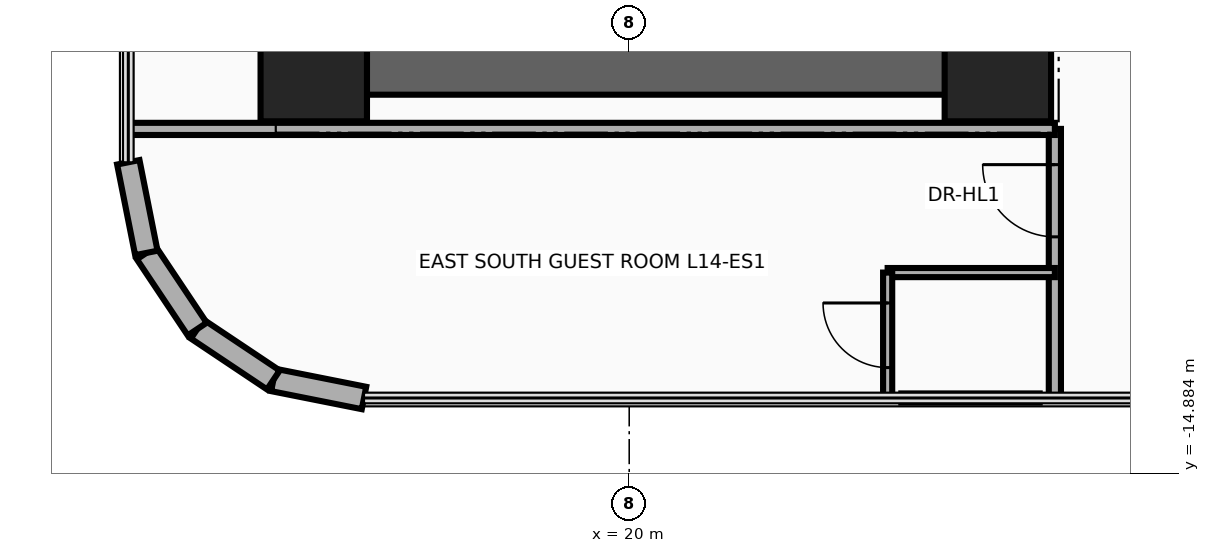
"""IFC4 building model, lengths in metres.
Left out: names, types, materials, properties, quantities, classifications, styles, units other than length and angle.
Written with IfcOpenShell. Run it as: python <this file> out.ifc"""

import sys

from ifc_helpers import new_model, si_unit, direction, frame, frame_2d, origin, origin_2d, place, context, subcontext, project, spatial, rectangle, extrude, source, transform, mapped, element, fill, save


model = new_model("IFC4")
c1 = context("Model", 3, precision=1e-05, world=origin(), true_north=direction((0.0, 1.0)))
c2 = subcontext(c1, "Body", "Model", "MODEL_VIEW")
j1 = project(units=[si_unit("LENGTHUNIT", "METRE"), si_unit("PLANEANGLEUNIT", "RADIAN")], contexts=[c1])
p1 = place(None, origin())
s1 = spatial("IfcSite", under=j1, at=p1, CompositionType="ELEMENT")
p2 = place(p1, origin())
s2 = spatial("IfcBuilding", under=s1, at=p2, CompositionType="ELEMENT")
p3 = place(p2, frame((0.0, 0.0, 59.3)))
s3 = spatial("IfcBuildingStorey", under=s2, at=p3, CompositionType="ELEMENT", Elevation=59.3)
p4 = place(p3, frame((24.85, -9.9, 0.0), z_axis=(0.0, 0.0, 1.0), x_axis=(0.0, 1.0, 0.0)))
e1 = element("IfcWall", 1, at=p4, inside=s3, PredefinedType="SHEAR", context=c2, shape_type="SweptSolid", body=[
    extrude(rectangle(XDim=8.95, YDim=0.7, at=frame_2d((4.475, 0.0))), origin(), (0.0, 0.0, 1.0), 3.46),
])
p5 = place(p3, frame((15.85, -9.55, 0.0), z_axis=(0.0, 0.0, 1.0), x_axis=(1.0, 0.0, 0.0)))
e2 = element("IfcWall", 2, at=p5, inside=s3, PredefinedType="SHEAR", context=c2, shape_type="SweptSolid", body=[
    extrude(rectangle(XDim=9.0, YDim=0.7, at=frame_2d((4.5, 0.0))), origin(), (0.0, 0.0, 1.0), 3.46),
])
m1 = source(origin(), c2, "Body", "SweptSolid", [
    extrude(rectangle(XDim=1.4, YDim=1.4, at=origin_2d()), origin(), (0.0, 0.0, 1.0), 3.7),
])
for number, where, z_axis, x_axis in (
    (3, (15.85, -9.55, 0.0), (0.0, 0.0, 1.0), (1.0, 0.0, 0.0)),
    (4, (24.85, -9.55, 0.0), (0.0, 0.0, 1.0), (1.0, 0.0, 0.0)),
):
    element("IfcColumn", number, at=place(p3, frame(where, z_axis=z_axis, x_axis=x_axis)), inside=s3, PredefinedType="COLUMN", context=c2, shape_type="MappedRepresentation", body=[
        mapped(m1, transform((0.0, 0.0, 0.0), x_axis=(1.0, 0.0, 0.0), y_axis=(0.0, 1.0, 0.0), z_axis=(0.0, 0.0, 1.0), scale=1.0)),
    ])
p6 = place(p3, frame((16.511, -13.89, 0.0), z_axis=(0.0, 0.0, 1.0), x_axis=(-0.980804027463, 0.194996050505, 0.0)))
e5 = element("IfcWall", 5, at=p6, inside=s3, PredefinedType="SOLIDWALL", context=c2, shape_type="SweptSolid", body=[
    extrude(rectangle(XDim=1.216, YDim=0.3, at=frame_2d((0.608, 0.0))), origin(), (0.0, 0.0, 1.0), 3.46),
])
for number, where, z_axis, x_axis in (
    (6, (15.318, -13.653, 0.0), (0.0, 0.0, 1.0), (-0.831, 0.556, 0.0)),
    (7, (14.317, -12.983, 0.0), (0.0, 0.0, 1.0), (-0.556, 0.831, 0.0)),
):
    element("IfcWall", number, at=place(p3, frame(where, z_axis=z_axis, x_axis=x_axis)), inside=s3, PredefinedType="SOLIDWALL", context=c2, shape_type="SweptSolid", body=[
        extrude(rectangle(XDim=1.205, YDim=0.3, at=frame_2d((0.603, 0.0))), origin(), (0.0, 0.0, 1.0), 3.46),
    ])
p7 = place(p3, frame((13.647, -11.982, 0.0), z_axis=(0.0, 0.0, 1.0), x_axis=(-0.195189223115, 0.980765602568, 0.0)))
e8 = element("IfcWall", 8, at=p7, inside=s3, PredefinedType="SOLIDWALL", context=c2, shape_type="SweptSolid", body=[
    extrude(rectangle(XDim=1.216, YDim=0.3, at=frame_2d((0.608, 0.0))), origin(), (0.0, 0.0, 1.0), 3.46),
])
p8 = place(p3, frame((25.6, -13.89, 0.0), z_axis=(0.0, 0.0, 1.0), x_axis=(0.0, 1.0, 0.0)))
e9 = element("IfcWall", 9, at=p8, inside=s3, PredefinedType="PARTITIONING", context=c2, shape_type="SweptSolid", body=[
    extrude(rectangle(XDim=3.54, YDim=0.16, at=frame_2d((1.77, 0.0))), origin(), (0.0, 0.0, 1.0), 3.46),
])
p9 = place(p8, frame((2.12, 0.0, 0.0)))
e10 = element("IfcOpeningElement", 10, at=p9, cuts=e9, PredefinedType="OPENING", context=c2, shape_type="SweptSolid", body=[
    extrude(rectangle(XDim=0.95, YDim=2.15, at=frame_2d((0.475, 1.075))), frame((0.0, 0.095, 0.0), z_axis=(0.0, -1.0, 0.0), x_axis=(1.0, 0.0, 0.0)), (0.0, 0.0, 1.0), 0.19),
])
p10 = place(p3, frame((13.41, -10.35, 0.0), z_axis=(0.0, 0.0, 1.0), x_axis=(1.0, 0.0, 0.0)))
e11 = element("IfcWall", 11, at=p10, inside=s3, PredefinedType="PARTITIONING", context=c2, shape_type="SweptSolid", body=[
    extrude(rectangle(XDim=12.19, YDim=0.16, at=frame_2d((6.095, 0.0))), origin(), (0.0, 0.0, 1.0), 3.46),
])
p11 = place(p3, frame((23.4, -12.24, 0.0), z_axis=(0.0, 0.0, 1.0), x_axis=(1.0, 0.0, 0.0)))
e12 = element("IfcWall", 12, at=p11, inside=s3, PredefinedType="PARTITIONING", context=c2, shape_type="SweptSolid", body=[
    extrude(rectangle(XDim=2.2, YDim=0.12, at=frame_2d((1.1, 0.0))), origin(), (0.0, 0.0, 1.0), 3.46),
])
p12 = place(p3, frame((23.4, -13.89, 0.0), z_axis=(0.0, 0.0, 1.0), x_axis=(0.0, 1.0, 0.0)))
e13 = element("IfcWall", 13, at=p12, inside=s3, PredefinedType="PARTITIONING", context=c2, shape_type="SweptSolid", body=[
    extrude(rectangle(XDim=1.65, YDim=0.12, at=frame_2d((0.825, 0.0))), origin(), (0.0, 0.0, 1.0), 3.46),
])
p13 = place(p12, frame((0.4, 0.0, 0.0)))
e14 = element("IfcOpeningElement", 14, at=p13, cuts=e13, PredefinedType="OPENING", context=c2, shape_type="SweptSolid", body=[
    extrude(rectangle(XDim=0.85, YDim=2.1, at=frame_2d((0.425, 1.05))), frame((0.0, 0.075, 0.0), z_axis=(0.0, -1.0, 0.0), x_axis=(1.0, 0.0, 0.0)), (0.0, 0.0, 1.0), 0.15),
])
p14 = place(p3, frame((23.58, -13.89, 0.0), z_axis=(0.0, 0.0, 1.0), x_axis=(1.0, 0.0, 0.0)))
e15 = element("IfcWall", 15, at=p14, inside=s3, PredefinedType="PARTITIONING", context=c2, shape_type="SweptSolid", body=[
    extrude(rectangle(XDim=1.82, YDim=0.12, at=frame_2d((0.91, 0.0))), origin(), (0.0, 0.0, 1.0), 3.46),
])
p15 = place(p9, origin())
e16 = element("IfcDoor", 16, at=p15, inside=s3, OperationType="SINGLE_SWING_RIGHT", PredefinedType="DOOR", context=c2, shape_type="SweptSolid", body=[
    extrude(rectangle(XDim=0.95, YDim=2.15, at=frame_2d((0.475, 1.075))), frame((0.0, 0.025, 0.0), z_axis=(0.0, -1.0, 0.0), x_axis=(1.0, 0.0, 0.0)), (0.0, 0.0, 1.0), 0.05),
])
fill(e10, e16)
p16 = place(p13, origin())
e17 = element("IfcDoor", 17, at=p16, inside=s3, OperationType="SINGLE_SWING_LEFT", PredefinedType="DOOR", context=c2, shape_type="SweptSolid", body=[
    extrude(rectangle(XDim=0.85, YDim=2.1, at=frame_2d((0.425, 1.05))), frame((0.0, 0.025, 0.0), z_axis=(0.0, -1.0, 0.0), x_axis=(1.0, 0.0, 0.0)), (0.0, 0.0, 1.0), 0.05),
])
fill(e14, e17)
save(model, sys.argv[1])
